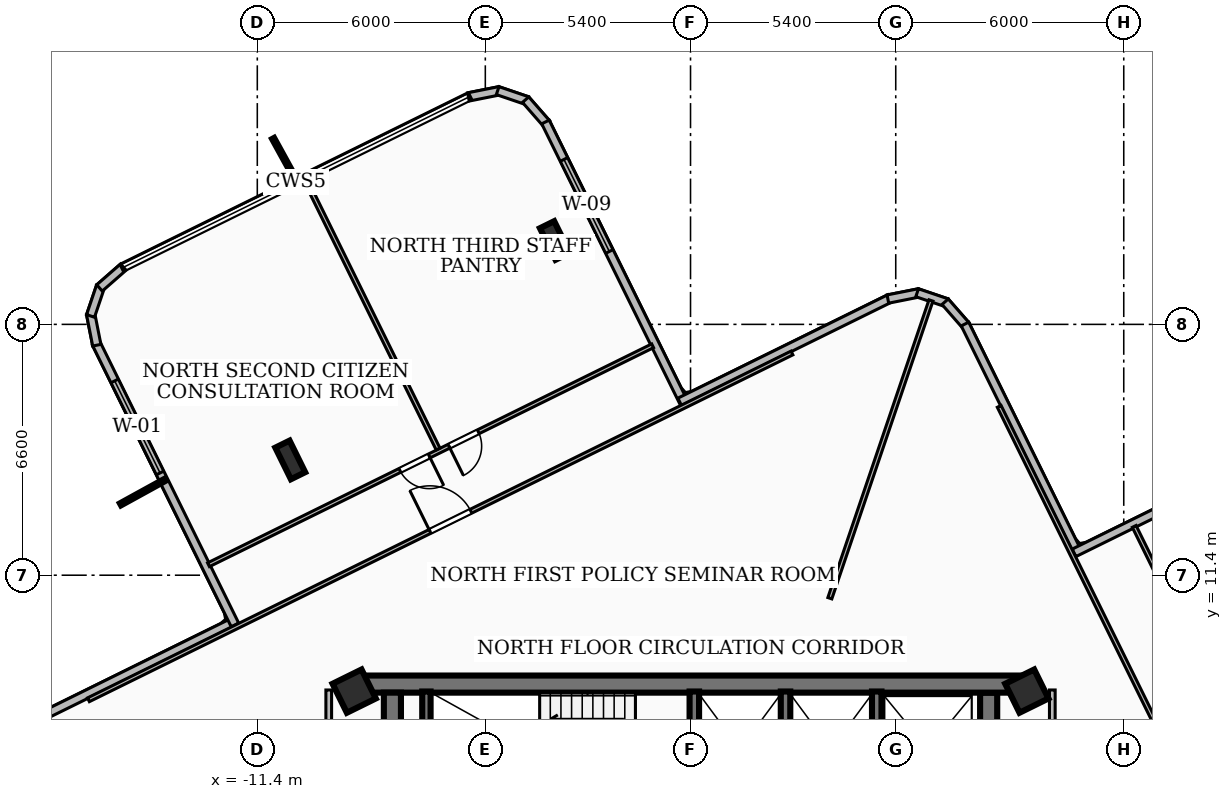
"""IFC4 building model, lengths in metres.
Left out: names, types, materials, properties, quantities, classifications, styles, units other than length and angle.
Written with IfcOpenShell. Run it as: python <this file> out.ifc"""

import sys

from ifc_helpers import new_model, si_unit, direction, frame, frame_2d, origin, origin_2d, place, context, subcontext, project, spatial, rectangle, i_section, extrude, element, fill, save


model = new_model("IFC4")
c1 = context("Model", 3, precision=1e-05, world=origin(), true_north=direction((0.0, 1.0)))
c2 = subcontext(c1, "Body", "Model", "MODEL_VIEW")
j1 = project(units=[si_unit("LENGTHUNIT", "METRE"), si_unit("PLANEANGLEUNIT", "RADIAN")], contexts=[c1])
p1 = place(None, origin())
s1 = spatial("IfcSite", under=j1, at=p1, CompositionType="ELEMENT")
p2 = place(p1, origin())
s2 = spatial("IfcBuilding", under=s1, at=p2, CompositionType="ELEMENT")
p3 = place(p2, frame((0.0, 0.0, 192.6)))
s3 = spatial("IfcBuildingStorey", under=s2, at=p3, CompositionType="ELEMENT", Elevation=192.6)
p4 = place(p3, frame((-8.78, 8.535, 0.0), z_axis=(0.0, 0.0, 1.0), x_axis=(1.0, 0.0, 0.0)))
e1 = element("IfcWall", 1, at=p4, inside=s3, PredefinedType="SHEAR", context=c2, shape_type="SweptSolid", body=[
    extrude(rectangle(XDim=17.56, YDim=0.45, at=frame_2d((8.78, 0.0))), origin(), (0.0, 0.0, 1.0), 3.2),
])
for number, where, z_axis, x_axis in (
    (2, (-7.845, 1.975, 0.0), (0.0, 0.0, 1.0), (0.0, 1.0, 0.0)),
    (3, (7.845, 8.31, 0.0), (0.0, 0.0, 1.0), (0.0, -1.0, 0.0)),
):
    element("IfcWall", number, at=place(p3, frame(where, z_axis=z_axis, x_axis=x_axis)), inside=s3, PredefinedType="SHEAR", context=c2, shape_type="SweptSolid", body=[
        extrude(rectangle(XDim=6.335, YDim=0.45, at=frame_2d((3.167, 0.0))), origin(), (0.0, 0.0, 1.0), 3.2),
    ])
p5 = place(p3, frame((-6.95, 5.28, 0.0), z_axis=(0.0, 0.0, 1.0), x_axis=(0.0, 1.0, 0.0)))
e4 = element("IfcWall", 4, at=p5, inside=s3, PredefinedType="SOLIDWALL", context=c2, shape_type="SweptSolid", body=[
    extrude(rectangle(XDim=3.06, YDim=0.22, at=frame_2d((1.53, 0.0))), origin(), (0.0, 0.0, 1.0), 3.2),
])
for number, where, z_axis, x_axis in (
    (5, (0.1, 5.3, 0.0), (0.0, 0.0, 1.0), (0.0, 1.0, 0.0)),
    (6, (2.5, 5.3, 0.0), (0.0, 0.0, 1.0), (0.0, 1.0, 0.0)),
    (7, (4.9, 5.3, 0.0), (0.0, 0.0, 1.0), (0.0, 1.0, 0.0)),
):
    element("IfcWall", number, at=place(p3, frame(where, z_axis=z_axis, x_axis=x_axis)), inside=s3, PredefinedType="SOLIDWALL", context=c2, shape_type="SweptSolid", body=[
        extrude(rectangle(XDim=3.04, YDim=0.25, at=frame_2d((1.52, 0.0))), origin(), (0.0, 0.0, 1.0), 3.2),
    ])
for number, where, z_axis, x_axis in (
    (8, (-8.85, 8.35, 0.0), (0.0, 0.0, 1.0), (0.897, 0.442, 0.0)),
    (9, (8.85, 8.35, 0.0), (0.0, 0.0, 1.0), (0.897, 0.442, 0.0)),
):
    element("IfcColumn", number, at=place(p3, frame(where, z_axis=z_axis, x_axis=x_axis)), inside=s3, PredefinedType="COLUMN", context=c2, shape_type="SweptSolid", body=[
        extrude(rectangle(XDim=0.85, YDim=0.85, at=origin_2d()), origin(), (0.0, 0.0, 1.0), 3.6),
    ])
for number, where, z_axis, x_axis in (
    (10, (-3.57, 20.207, 0.0), (0.0, 0.0, 1.0), (0.897, 0.442, 0.0)),
    (11, (-10.533, 14.433, 0.0), (0.0, 0.0, 1.0), (0.897, 0.442, 0.0)),
):
    element("IfcColumn", number, at=place(p3, frame(where, z_axis=z_axis, x_axis=x_axis)), inside=s3, PredefinedType="COLUMN", context=c2, shape_type="SweptSolid", body=[
        extrude(i_section(OverallWidth=0.418, OverallDepth=0.927, WebThickness=0.019, FlangeThickness=0.032, at=origin_2d()), origin(), (0.0, 0.0, 1.0), 3.6),
    ])
p6 = place(p3, frame((-18.009, 7.222, 0.0), z_axis=(0.0, 0.0, 1.0), x_axis=(0.896927600032, 0.44217743079, 0.0)))
e12 = element("IfcWall", 12, at=p6, inside=s3, PredefinedType="SOLIDWALL", context=c2, shape_type="SweptSolid", body=[
    extrude(rectangle(XDim=6.758, YDim=0.22, at=frame_2d((3.379, 0.0))), origin(), (0.0, 0.0, 1.0), 3.2),
])
p7 = place(p3, frame((-11.988, 10.092, 0.0), z_axis=(0.0, 0.0, 1.0), x_axis=(-0.442109392901, 0.896961138907, 0.0)))
e13 = element("IfcWall", 13, at=p7, inside=s3, PredefinedType="SOLIDWALL", context=c2, shape_type="SweptSolid", body=[
    extrude(rectangle(XDim=8.258, YDim=0.22, at=frame_2d((4.129, 0.0))), origin(), (0.0, 0.0, 1.0), 3.2),
])
p8 = place(p7, frame((4.458, 0.0, 0.85)))
e14 = element("IfcOpeningElement", 14, at=p8, cuts=e13, PredefinedType="OPENING", context=c2, shape_type="SweptSolid", body=[
    extrude(rectangle(XDim=2.7, YDim=2.1, at=frame_2d((1.35, 1.05))), frame((0.0, 0.12, 0.0), z_axis=(0.0, -1.0, 0.0), x_axis=(1.0, 0.0, 0.0)), (0.0, 0.0, 1.0), 0.24),
])
p9 = place(p3, frame((-15.623, 17.452, 0.0), z_axis=(0.0, 0.0, 1.0), x_axis=(-0.193866328911, 0.981027953992, 0.0)))
e15 = element("IfcWall", 15, at=p9, inside=s3, PredefinedType="SOLIDWALL", context=c2, shape_type="SweptSolid", body=[
    extrude(rectangle(XDim=0.835, YDim=0.22, at=frame_2d((0.417, 0.0))), origin(), (0.0, 0.0, 1.0), 3.2),
])
p10 = place(p3, frame((-15.788, 18.222, 0.0), z_axis=(0.0, 0.0, 1.0), x_axis=(0.320776894908, 0.947154783387, 0.0)))
e16 = element("IfcWall", 16, at=p10, inside=s3, PredefinedType="SOLIDWALL", context=c2, shape_type="SweptSolid", body=[
    extrude(rectangle(XDim=0.821, YDim=0.22, at=frame_2d((0.41, 0.0))), origin(), (0.0, 0.0, 1.0), 3.2),
])
p11 = place(p3, frame((-15.552, 18.959, 0.0), z_axis=(0.0, 0.0, 1.0), x_axis=(0.752794227209, 0.658255916404, 0.0)))
e17 = element("IfcWall", 17, at=p11, inside=s3, PredefinedType="SOLIDWALL", context=c2, shape_type="SweptSolid", body=[
    extrude(rectangle(XDim=0.834, YDim=0.22, at=frame_2d((0.417, 0.0))), origin(), (0.0, 0.0, 1.0), 3.2),
])
p12 = place(p3, frame((-5.845, 23.984, 0.0), z_axis=(0.0, 0.0, 1.0), x_axis=(0.980748961915, 0.195272818647, 0.0)))
e18 = element("IfcWall", 18, at=p12, inside=s3, PredefinedType="SOLIDWALL", context=c2, shape_type="SweptSolid", body=[
    extrude(rectangle(XDim=0.835, YDim=0.22, at=frame_2d((0.417, 0.0))), origin(), (0.0, 0.0, 1.0), 3.2),
])
p13 = place(p3, frame((-5.075, 24.15, 0.0), z_axis=(0.0, 0.0, 1.0), x_axis=(0.946729156516, -0.322030905662, 0.0)))
e19 = element("IfcWall", 19, at=p13, inside=s3, PredefinedType="SOLIDWALL", context=c2, shape_type="SweptSolid", body=[
    extrude(rectangle(XDim=0.82, YDim=0.22, at=frame_2d((0.41, 0.0))), origin(), (0.0, 0.0, 1.0), 3.2),
])
p14 = place(p3, frame((-4.339, 23.913, 0.0), z_axis=(0.0, 0.0, 1.0), x_axis=(0.65811089996, -0.75292100738, 0.0)))
e20 = element("IfcWall", 20, at=p14, inside=s3, PredefinedType="SOLIDWALL", context=c2, shape_type="SweptSolid", body=[
    extrude(rectangle(XDim=0.834, YDim=0.22, at=frame_2d((0.417, 0.0))), origin(), (0.0, 0.0, 1.0), 3.2),
])
p15 = place(p3, frame((-3.817, 23.326, 0.0), z_axis=(0.0, 0.0, 1.0), x_axis=(0.442156293263, -0.896938020338, 0.0)))
e21 = element("IfcWall", 21, at=p15, inside=s3, PredefinedType="SOLIDWALL", context=c2, shape_type="SweptSolid", body=[
    extrude(rectangle(XDim=8.257, YDim=0.22, at=frame_2d((4.128, 0.0))), origin(), (0.0, 0.0, 1.0), 3.2),
])
p16 = place(p15, frame((1.1, 0.0, 0.85)))
e22 = element("IfcOpeningElement", 22, at=p16, cuts=e21, PredefinedType="OPENING", context=c2, shape_type="SweptSolid", body=[
    extrude(rectangle(XDim=2.7, YDim=1.65, at=frame_2d((1.35, 0.825))), frame((0.0, 0.12, 0.0), z_axis=(0.0, -1.0, 0.0), x_axis=(1.0, 0.0, 0.0)), (0.0, 0.0, 1.0), 0.24),
])
p17 = place(p3, frame((-0.284, 15.96, 0.0), z_axis=(0.0, 0.0, 1.0), x_axis=(0.897012793167, 0.442004580174, 0.0)))
e23 = element("IfcWall", 23, at=p17, inside=s3, PredefinedType="SOLIDWALL", context=c2, shape_type="SweptSolid", body=[
    extrude(rectangle(XDim=6.158, YDim=0.22, at=frame_2d((3.079, 0.0))), origin(), (0.0, 0.0, 1.0), 3.2),
])
p18 = place(p3, frame((5.193, 18.666, 0.0), z_axis=(0.0, 0.0, 1.0), x_axis=(0.980737810353, 0.19532881852, 0.0)))
e24 = element("IfcWall", 24, at=p18, inside=s3, PredefinedType="SOLIDWALL", context=c2, shape_type="SweptSolid", body=[
    extrude(rectangle(XDim=0.835, YDim=0.22, at=frame_2d((0.417, 0.0))), origin(), (0.0, 0.0, 1.0), 3.2),
])
p19 = place(p3, frame((5.963, 18.832, 0.0), z_axis=(0.0, 0.0, 1.0), x_axis=(0.947245162699, -0.320509908962, 0.0)))
e25 = element("IfcWall", 25, at=p19, inside=s3, PredefinedType="SOLIDWALL", context=c2, shape_type="SweptSolid", body=[
    extrude(rectangle(XDim=0.82, YDim=0.22, at=frame_2d((0.41, 0.0))), origin(), (0.0, 0.0, 1.0), 3.2),
])
p20 = place(p3, frame((6.7, 18.596, 0.0), z_axis=(0.0, 0.0, 1.0), x_axis=(0.658255916404, -0.752794227209, 0.0)))
e26 = element("IfcWall", 26, at=p20, inside=s3, PredefinedType="SOLIDWALL", context=c2, shape_type="SweptSolid", body=[
    extrude(rectangle(XDim=0.834, YDim=0.22, at=frame_2d((0.417, 0.0))), origin(), (0.0, 0.0, 1.0), 3.2),
])
p21 = place(p3, frame((7.222, 18.009, 0.0), z_axis=(0.0, 0.0, 1.0), x_axis=(0.44217743079, -0.896927600032, 0.0)))
e27 = element("IfcWall", 27, at=p21, inside=s3, PredefinedType="SOLIDWALL", context=c2, shape_type="SweptSolid", body=[
    extrude(rectangle(XDim=6.758, YDim=0.22, at=frame_2d((3.379, 0.0))), origin(), (0.0, 0.0, 1.0), 3.2),
])
p22 = place(p3, frame((10.092, 11.988, 0.0), z_axis=(0.0, 0.0, 1.0), x_axis=(0.896973397182, 0.442084522177, 0.0)))
e28 = element("IfcWall", 28, at=p22, inside=s3, PredefinedType="SOLIDWALL", context=c2, shape_type="SweptSolid", body=[
    extrude(rectangle(XDim=9.858, YDim=0.22, at=frame_2d((4.929, 0.0))), origin(), (0.0, 0.0, 1.0), 3.2),
])
p23 = place(p22, frame((6.339, 0.0, 0.85)))
e29 = element("IfcOpeningElement", 29, at=p23, cuts=e28, PredefinedType="OPENING", context=c2, shape_type="SweptSolid", body=[
    extrude(rectangle(XDim=2.7, YDim=1.85, at=frame_2d((1.35, 0.925))), frame((0.0, 0.12, 0.0), z_axis=(0.0, -1.0, 0.0), x_axis=(1.0, 0.0, 0.0)), (0.0, 0.0, 1.0), 0.24),
])
p24 = place(p3, frame((-9.52, 1.75, 0.0), z_axis=(0.0, 0.0, 1.0), x_axis=(0.0, 1.0, 0.0)))
e30 = element("IfcWall", 30, at=p24, inside=s3, PredefinedType="PARTITIONING", context=c2, shape_type="SweptSolid", body=[
    extrude(rectangle(XDim=6.63, YDim=0.15, at=frame_2d((3.315, 0.0))), origin(), (0.0, 0.0, 1.0), 3.2),
])
p25 = place(p3, frame((9.52, 1.75, 0.0), z_axis=(0.0, 0.0, 1.0), x_axis=(0.0, 1.0, 0.0)))
e31 = element("IfcWall", 31, at=p25, inside=s3, PredefinedType="PARTITIONING", context=c2, shape_type="SweptSolid", body=[
    extrude(rectangle(XDim=6.63, YDim=0.15, at=frame_2d((3.315, 0.0))), origin(), (0.0, 0.0, 1.0), 2.504),
])
p26 = place(p3, frame((3.666, 10.794, 0.0), z_axis=(0.0, 0.0, 1.0), x_axis=(0.32157793417, 0.946883114357, 0.0)))
e32 = element("IfcWall", 32, at=p26, inside=s3, PredefinedType="PARTITIONING", context=c2, shape_type="SweptSolid", body=[
    extrude(rectangle(XDim=8.274, YDim=0.11, at=frame_2d((4.137, 0.0))), origin(), (0.0, 0.0, 1.0), 3.2),
])
p27 = place(p3, frame((8.122, 15.843, 0.0), z_axis=(0.0, 0.0, 1.0), x_axis=(0.442129285211, -0.896951333774, 0.0)))
e33 = element("IfcWall", 33, at=p27, inside=s3, PredefinedType="PARTITIONING", context=c2, shape_type="SweptSolid", body=[
    extrude(rectangle(XDim=20.639, YDim=0.11, at=frame_2d((10.319, 0.0))), origin(), (0.0, 0.0, 1.0), 2.504),
])
p28 = place(p27, frame((10.02, 0.0, 0.0)))
e34 = element("IfcOpeningElement", 34, at=p28, cuts=e33, PredefinedType="OPENING", context=c2, shape_type="SweptSolid", body=[
    extrude(rectangle(XDim=1.2, YDim=2.1, at=frame_2d((0.6, 1.05))), frame((0.0, 0.065, 0.0), z_axis=(0.0, -1.0, 0.0), x_axis=(1.0, 0.0, 0.0)), (0.0, 0.0, 1.0), 0.13),
])
p29 = place(p3, frame((17.436, 0.997, 0.0), z_axis=(0.0, 0.0, 1.0), x_axis=(-0.442139902385, 0.896946100231, 0.0)))
e35 = element("IfcWall", 35, at=p29, inside=s3, PredefinedType="PARTITIONING", context=c2, shape_type="SweptSolid", body=[
    extrude(rectangle(XDim=13.03, YDim=0.11, at=frame_2d((6.515, 0.0))), origin(), (0.0, 0.0, 1.0), 2.504),
])
p30 = place(p29, frame((5.115, 0.0, 0.0)))
e36 = element("IfcOpeningElement", 36, at=p30, cuts=e35, PredefinedType="OPENING", context=c2, shape_type="SweptSolid", body=[
    extrude(rectangle(XDim=0.86, YDim=2.04, at=frame_2d((0.43, 1.02))), frame((0.0, 0.065, 0.0), z_axis=(0.0, -1.0, 0.0), x_axis=(1.0, 0.0, 0.0)), (0.0, 0.0, 1.0), 0.13),
])
p31 = place(p29, frame((6.555, 0.0, 0.0)))
e37 = element("IfcOpeningElement", 37, at=p31, cuts=e35, PredefinedType="OPENING", context=c2, shape_type="SweptSolid", body=[
    extrude(rectangle(XDim=0.86, YDim=2.04, at=frame_2d((0.43, 1.02))), frame((0.0, 0.065, 0.0), z_axis=(0.0, -1.0, 0.0), x_axis=(1.0, 0.0, 0.0)), (0.0, 0.0, 1.0), 0.13),
])
p32 = place(p3, frame((-15.843, 8.122, 0.0), z_axis=(0.0, 0.0, 1.0), x_axis=(0.896951333774, 0.442129285211, 0.0)))
e38 = element("IfcWall", 38, at=p32, inside=s3, PredefinedType="PARTITIONING", context=c2, shape_type="SweptSolid", body=[
    extrude(rectangle(XDim=20.639, YDim=0.11, at=frame_2d((10.319, 0.0))), origin(), (0.0, 0.0, 1.0), 2.504),
])
p33 = place(p32, frame((10.02, 0.0, 0.0)))
e39 = element("IfcOpeningElement", 39, at=p33, cuts=e38, PredefinedType="OPENING", context=c2, shape_type="SweptSolid", body=[
    extrude(rectangle(XDim=1.2, YDim=2.1, at=frame_2d((0.6, 1.05))), frame((0.0, 0.065, 0.0), z_axis=(0.0, -1.0, 0.0), x_axis=(1.0, 0.0, 0.0)), (0.0, 0.0, 1.0), 0.13),
])
p34 = place(p3, frame((-6.643, 14.72, 0.0), z_axis=(0.0, 0.0, 1.0), x_axis=(-0.442022597005, 0.897003915118, 0.0)))
e40 = element("IfcWall", 40, at=p34, inside=s3, PredefinedType="PARTITIONING", context=c2, shape_type="SweptSolid", body=[
    extrude(rectangle(XDim=7.875, YDim=0.11, at=frame_2d((3.938, 0.0))), origin(), (0.0, 0.0, 1.0), 3.2),
])
p35 = place(p3, frame((-0.997, 17.436, 0.0), z_axis=(0.0, 0.0, 1.0), x_axis=(-0.896946100231, -0.442139902385, 0.0)))
e41 = element("IfcWall", 41, at=p35, inside=s3, PredefinedType="PARTITIONING", context=c2, shape_type="SweptSolid", body=[
    extrude(rectangle(XDim=13.03, YDim=0.11, at=frame_2d((6.515, 0.0))), origin(), (0.0, 0.0, 1.0), 2.504),
])
p36 = place(p35, frame((5.115, 0.0, 0.0)))
e42 = element("IfcOpeningElement", 42, at=p36, cuts=e41, PredefinedType="OPENING", context=c2, shape_type="SweptSolid", body=[
    extrude(rectangle(XDim=0.86, YDim=2.04, at=frame_2d((0.43, 1.02))), frame((0.0, 0.065, 0.0), z_axis=(0.0, -1.0, 0.0), x_axis=(1.0, 0.0, 0.0)), (0.0, 0.0, 1.0), 0.13),
])
p37 = place(p35, frame((6.555, 0.0, 0.0)))
e43 = element("IfcOpeningElement", 43, at=p37, cuts=e41, PredefinedType="OPENING", context=c2, shape_type="SweptSolid", body=[
    extrude(rectangle(XDim=0.86, YDim=2.04, at=frame_2d((0.43, 1.02))), frame((0.0, 0.065, 0.0), z_axis=(0.0, -1.0, 0.0), x_axis=(1.0, 0.0, 0.0)), (0.0, 0.0, 1.0), 0.13),
])
p38 = place(p8, origin())
e44 = element("IfcWindow", 44, at=p38, inside=s3, PartitioningType="SINGLE_PANEL", PredefinedType="WINDOW", context=c2, shape_type="SweptSolid", body=[
    extrude(rectangle(XDim=2.7, YDim=2.1, at=frame_2d((1.35, 1.05))), frame((0.0, 0.03, 0.0), z_axis=(0.0, -1.0, 0.0), x_axis=(1.0, 0.0, 0.0)), (0.0, 0.0, 1.0), 0.06),
])
fill(e14, e44)
p39 = place(p16, origin())
e45 = element("IfcWindow", 45, at=p39, inside=s3, PartitioningType="SINGLE_PANEL", PredefinedType="WINDOW", context=c2, shape_type="SweptSolid", body=[
    extrude(rectangle(XDim=2.7, YDim=1.65, at=frame_2d((1.35, 0.825))), frame((0.0, 0.03, 0.0), z_axis=(0.0, -1.0, 0.0), x_axis=(1.0, 0.0, 0.0)), (0.0, 0.0, 1.0), 0.06),
])
fill(e22, e45)
p40 = place(p33, origin())
e46 = element("IfcDoor", 46, at=p40, inside=s3, OperationType="SINGLE_SWING_LEFT", PredefinedType="DOOR", context=c2, shape_type="SweptSolid", body=[
    extrude(rectangle(XDim=1.2, YDim=2.1, at=frame_2d((0.6, 1.05))), frame((0.0, 0.025, 0.0), z_axis=(0.0, -1.0, 0.0), x_axis=(1.0, 0.0, 0.0)), (0.0, 0.0, 1.0), 0.05),
])
fill(e39, e46)
p41 = place(p36, origin())
e47 = element("IfcDoor", 47, at=p41, inside=s3, OperationType="SINGLE_SWING_RIGHT", PredefinedType="DOOR", context=c2, shape_type="SweptSolid", body=[
    extrude(rectangle(XDim=0.86, YDim=2.04, at=frame_2d((0.43, 1.02))), frame((0.0, 0.025, 0.0), z_axis=(0.0, -1.0, 0.0), x_axis=(1.0, 0.0, 0.0)), (0.0, 0.0, 1.0), 0.05),
])
fill(e42, e47)
p42 = place(p37, origin())
e48 = element("IfcDoor", 48, at=p42, inside=s3, OperationType="SINGLE_SWING_LEFT", PredefinedType="DOOR", context=c2, shape_type="SweptSolid", body=[
    extrude(rectangle(XDim=0.86, YDim=2.04, at=frame_2d((0.43, 1.02))), frame((0.0, 0.025, 0.0), z_axis=(0.0, -1.0, 0.0), x_axis=(1.0, 0.0, 0.0)), (0.0, 0.0, 1.0), 0.05),
])
fill(e43, e48)
save(model, sys.argv[1])
